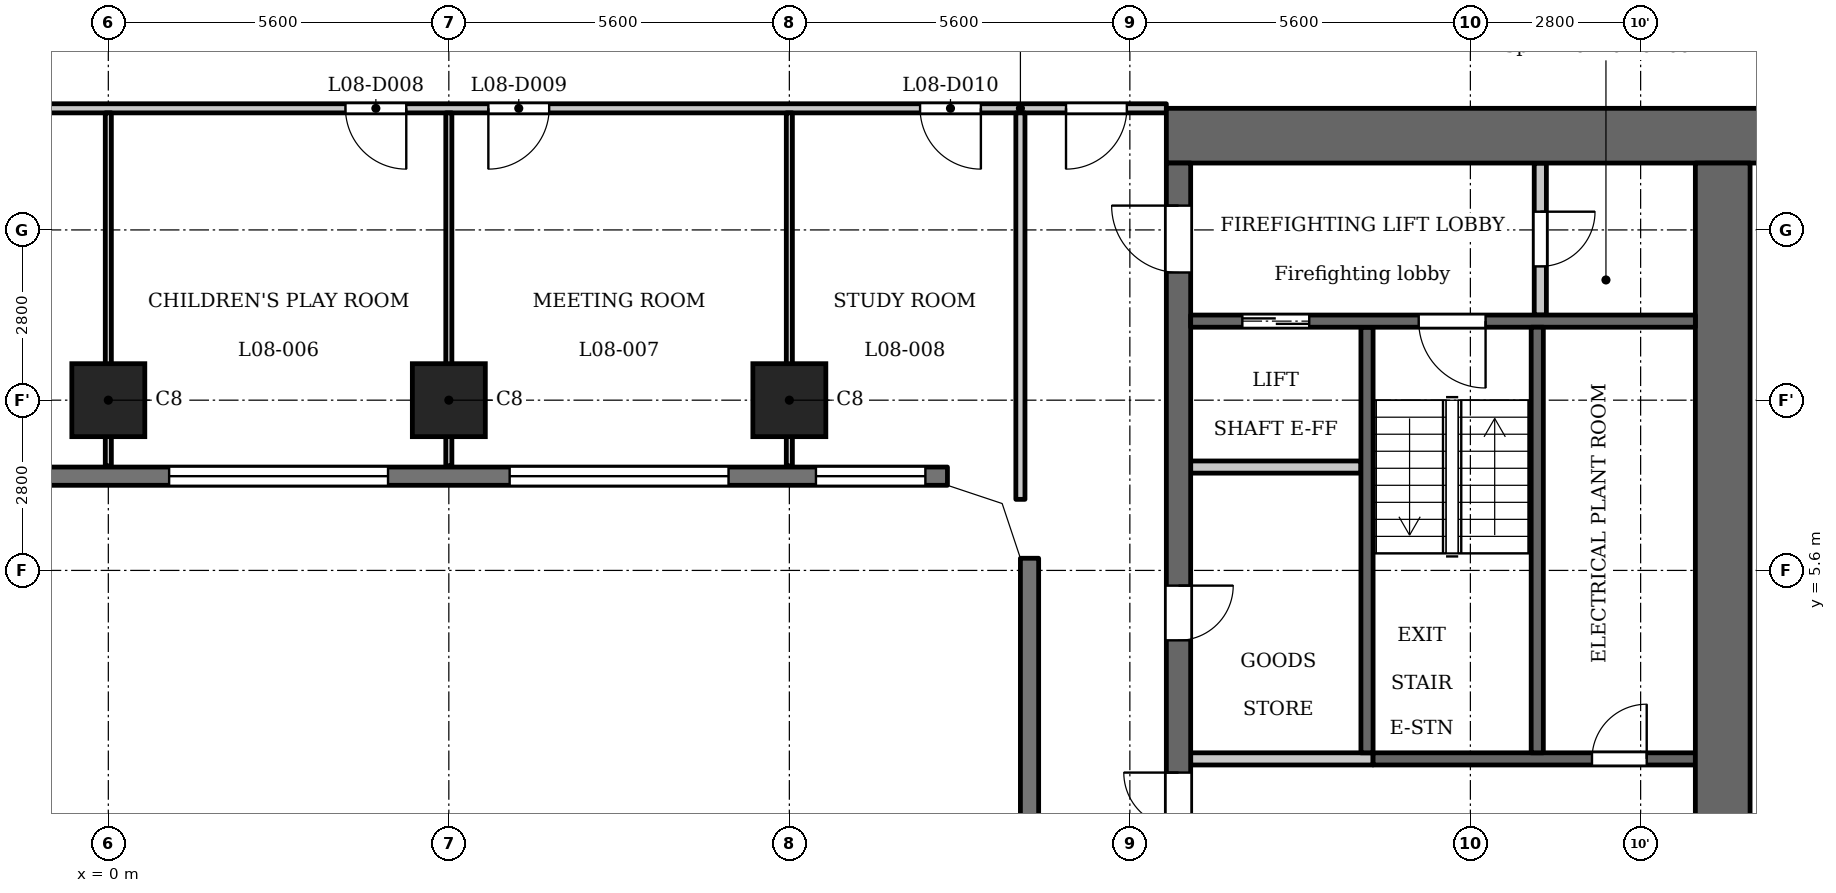
"""IFC4 building model, lengths in metres.
Left out: names, types, materials, properties, quantities, classifications, styles, units other than length and angle.
Written with IfcOpenShell. Run it as: python <this file> out.ifc"""

import sys

from ifc_helpers import new_model, si_unit, direction, frame, frame_2d, origin, origin_2d, place, context, subcontext, project, spatial, polyline, rectangle, outline, extrude, element, fill, save


model = new_model("IFC4")
c1 = context("Model", 3, precision=1e-05, world=origin(), true_north=direction((0.0, 1.0)))
c2 = subcontext(c1, "Body", "Model", "MODEL_VIEW")
j1 = project(units=[si_unit("LENGTHUNIT", "METRE"), si_unit("PLANEANGLEUNIT", "RADIAN")], contexts=[c1])
p1 = place(None, origin())
s1 = spatial("IfcSite", under=j1, at=p1, CompositionType="ELEMENT")
p2 = place(p1, origin())
s2 = spatial("IfcBuilding", under=s1, at=p2, CompositionType="ELEMENT")
p3 = place(p2, frame((0.0, 0.0, 37.5)))
s3 = spatial("IfcBuildingStorey", under=s2, at=p3, CompositionType="ELEMENT", Elevation=37.5)
for number, where, z_axis, x_axis in (
    (1, (0.0, 8.4, 0.0), (0.0, 0.0, 1.0), (1.0, 0.0, 0.0)),
    (2, (5.6, 8.4, 0.0), (0.0, 0.0, 1.0), (1.0, 0.0, 0.0)),
    (3, (11.2, 8.4, 0.0), (0.0, 0.0, 1.0), (1.0, 0.0, 0.0)),
):
    element("IfcColumn", number, at=place(p3, frame(where, z_axis=z_axis, x_axis=x_axis)), inside=s3, PredefinedType="COLUMN", context=c2, shape_type="SweptSolid", body=[
        extrude(rectangle(XDim=1.2, YDim=1.2, at=origin_2d()), origin(), (0.0, 0.0, 1.0), 3.5),
    ])
p4 = place(p3, frame((-13.8, 7.15, 0.0), z_axis=(0.0, 0.0, 1.0), x_axis=(1.0, 0.0, 0.0)))
e4 = element("IfcWall", 4, at=p4, inside=s3, PredefinedType="SOLIDWALL", context=c2, shape_type="SweptSolid", body=[
    extrude(rectangle(XDim=27.6, YDim=0.3, at=frame_2d((13.8, 0.0))), origin(), (0.0, 0.0, 1.0), 3.2),
])
p5 = place(p4, frame((0.363, 0.0, 0.9)))
e5 = element("IfcOpeningElement", 5, at=p5, cuts=e4, PredefinedType="OPENING", context=c2, shape_type="SweptSolid", body=[
    extrude(rectangle(XDim=1.8, YDim=1.25, at=frame_2d((0.9, 0.625))), frame((0.0, 0.16, 0.0), z_axis=(0.0, -1.0, 0.0), x_axis=(1.0, 0.0, 0.0)), (0.0, 0.0, 1.0), 0.32),
])
p6 = place(p4, frame((3.6, 0.0, 1.2)))
e6 = element("IfcOpeningElement", 6, at=p6, cuts=e4, PredefinedType="OPENING", context=c2, shape_type="SweptSolid", body=[
    extrude(rectangle(XDim=3.6, YDim=0.95, at=frame_2d((1.8, 0.475))), frame((0.0, 0.16, 0.0), z_axis=(0.0, -1.0, 0.0), x_axis=(1.0, 0.0, 0.0)), (0.0, 0.0, 1.0), 0.32),
])
p7 = place(p4, frame((9.2, 0.0, 1.2)))
e7 = element("IfcOpeningElement", 7, at=p7, cuts=e4, PredefinedType="OPENING", context=c2, shape_type="SweptSolid", body=[
    extrude(rectangle(XDim=3.6, YDim=0.95, at=frame_2d((1.8, 0.475))), frame((0.0, 0.16, 0.0), z_axis=(0.0, -1.0, 0.0), x_axis=(1.0, 0.0, 0.0)), (0.0, 0.0, 1.0), 0.32),
])
p8 = place(p4, frame((14.8, 0.0, 1.2)))
e8 = element("IfcOpeningElement", 8, at=p8, cuts=e4, PredefinedType="OPENING", context=c2, shape_type="SweptSolid", body=[
    extrude(rectangle(XDim=3.6, YDim=0.95, at=frame_2d((1.8, 0.475))), frame((0.0, 0.16, 0.0), z_axis=(0.0, -1.0, 0.0), x_axis=(1.0, 0.0, 0.0)), (0.0, 0.0, 1.0), 0.32),
])
p9 = place(p4, frame((20.4, 0.0, 1.2)))
e9 = element("IfcOpeningElement", 9, at=p9, cuts=e4, PredefinedType="OPENING", context=c2, shape_type="SweptSolid", body=[
    extrude(rectangle(XDim=3.6, YDim=0.95, at=frame_2d((1.8, 0.475))), frame((0.0, 0.16, 0.0), z_axis=(0.0, -1.0, 0.0), x_axis=(1.0, 0.0, 0.0)), (0.0, 0.0, 1.0), 0.32),
])
p10 = place(p4, frame((25.438, 0.0, 0.9)))
e10 = element("IfcOpeningElement", 10, at=p10, cuts=e4, PredefinedType="OPENING", context=c2, shape_type="SweptSolid", body=[
    extrude(rectangle(XDim=1.8, YDim=1.25, at=frame_2d((0.9, 0.625))), frame((0.0, 0.16, 0.0), z_axis=(0.0, -1.0, 0.0), x_axis=(1.0, 0.0, 0.0)), (0.0, 0.0, 1.0), 0.32),
])
p11 = place(p3, frame((15.15, 5.8, 0.0), z_axis=(0.0, 0.0, 1.0), x_axis=(0.0, -1.0, 0.0)))
e11 = element("IfcWall", 11, at=p11, inside=s3, PredefinedType="SOLIDWALL", context=c2, shape_type="SweptSolid", body=[
    extrude(rectangle(XDim=11.6, YDim=0.3, at=frame_2d((5.8, 0.0))), origin(), (0.0, 0.0, 1.0), 3.2),
])
p12 = place(p3, frame((20.7, 2.6, 0.0), z_axis=(0.0, 0.0, 1.0), x_axis=(0.0, 1.0, 0.0)))
e12 = element("IfcWall", 12, at=p12, inside=s3, PredefinedType="SHEAR", context=c2, shape_type="SweptSolid", body=[
    extrude(rectangle(XDim=7.0, YDim=0.2, at=frame_2d((3.5, 0.0))), origin(), (0.0, 0.0, 1.0), 3.2),
])
p13 = place(p3, frame((20.8, 2.5, 0.0), z_axis=(0.0, 0.0, 1.0), x_axis=(1.0, 0.0, 0.0)))
e13 = element("IfcWall", 13, at=p13, inside=s3, PredefinedType="SHEAR", context=c2, shape_type="SweptSolid", body=[
    extrude(rectangle(XDim=5.3, YDim=0.2, at=frame_2d((2.65, 0.0))), origin(), (0.0, 0.0, 1.0), 3.2),
])
p14 = place(p13, frame((3.6, 0.0, 0.0)))
e14 = element("IfcOpeningElement", 14, at=p14, cuts=e13, PredefinedType="OPENING", context=c2, shape_type="SweptSolid", body=[
    extrude(rectangle(XDim=0.9, YDim=2.1, at=frame_2d((0.45, 1.05))), frame((0.0, 0.11, 0.0), z_axis=(0.0, -1.0, 0.0), x_axis=(1.0, 0.0, 0.0)), (0.0, 0.0, 1.0), 0.22),
])
p15 = place(p3, frame((17.4, 12.75, 0.0), z_axis=(0.0, 0.0, 1.0), x_axis=(1.0, 0.0, 0.0)))
e15 = element("IfcWall", 15, at=p15, inside=s3, PredefinedType="SHEAR", context=c2, shape_type="SweptSolid", body=[
    extrude(rectangle(XDim=10.4, YDim=0.9, at=frame_2d((5.2, 0.0))), origin(), (0.0, 0.0, 1.0), 3.2),
])
p16 = place(p3, frame((17.6, -12.3, 0.0), z_axis=(0.0, 0.0, 1.0), x_axis=(0.0, 1.0, 0.0)))
e16 = element("IfcWall", 16, at=p16, inside=s3, PredefinedType="SHEAR", context=c2, shape_type="SweptSolid", body=[
    extrude(rectangle(XDim=24.6, YDim=0.4, at=frame_2d((12.3, 0.0))), origin(), (0.0, 0.0, 1.0), 3.2),
])
p17 = place(p16, frame((6.0, 0.0, 0.0)))
e17 = element("IfcOpeningElement", 17, at=p17, cuts=e16, PredefinedType="OPENING", context=c2, shape_type="SweptSolid", body=[
    extrude(rectangle(XDim=1.1, YDim=2.1, at=frame_2d((0.55, 1.05))), frame((0.0, 0.21, 0.0), z_axis=(0.0, -1.0, 0.0), x_axis=(1.0, 0.0, 0.0)), (0.0, 0.0, 1.0), 0.42),
])
p18 = place(p16, frame((8.4, 0.0, 0.0)))
e18 = element("IfcOpeningElement", 18, at=p18, cuts=e16, PredefinedType="OPENING", context=c2, shape_type="SweptSolid", body=[
    extrude(rectangle(XDim=1.1, YDim=2.1, at=frame_2d((0.55, 1.05))), frame((0.0, 0.21, 0.0), z_axis=(0.0, -1.0, 0.0), x_axis=(1.0, 0.0, 0.0)), (0.0, 0.0, 1.0), 0.42),
])
p19 = place(p16, frame((10.8, 0.0, 0.0)))
e19 = element("IfcOpeningElement", 19, at=p19, cuts=e16, PredefinedType="OPENING", context=c2, shape_type="SweptSolid", body=[
    extrude(rectangle(XDim=1.1, YDim=2.1, at=frame_2d((0.55, 1.05))), frame((0.0, 0.21, 0.0), z_axis=(0.0, -1.0, 0.0), x_axis=(1.0, 0.0, 0.0)), (0.0, 0.0, 1.0), 0.42),
])
p20 = place(p16, frame((16.75, 0.0, 0.0)))
e20 = element("IfcOpeningElement", 20, at=p20, cuts=e16, PredefinedType="OPENING", context=c2, shape_type="SweptSolid", body=[
    extrude(rectangle(XDim=0.9, YDim=2.1, at=frame_2d((0.45, 1.05))), frame((0.0, 0.21, 0.0), z_axis=(0.0, -1.0, 0.0), x_axis=(1.0, 0.0, 0.0)), (0.0, 0.0, 1.0), 0.42),
])
p21 = place(p16, frame((22.8, 0.0, 0.0)))
e21 = element("IfcOpeningElement", 21, at=p21, cuts=e16, PredefinedType="OPENING", context=c2, shape_type="SweptSolid", body=[
    extrude(rectangle(XDim=1.1, YDim=2.1, at=frame_2d((0.55, 1.05))), frame((0.0, 0.21, 0.0), z_axis=(0.0, -1.0, 0.0), x_axis=(1.0, 0.0, 0.0)), (0.0, 0.0, 1.0), 0.42),
])
p22 = place(p16, frame((0.7, 0.0, 0.0)))
e22 = element("IfcOpeningElement", 22, at=p22, cuts=e16, PredefinedType="OPENING", context=c2, shape_type="SweptSolid", body=[
    extrude(rectangle(XDim=1.1, YDim=2.1, at=frame_2d((0.55, 1.05))), frame((0.0, 0.21, 0.0), z_axis=(0.0, -1.0, 0.0), x_axis=(1.0, 0.0, 0.0)), (0.0, 0.0, 1.0), 0.42),
])
p23 = place(p16, frame((12.775, 0.0, 0.0)))
e23 = element("IfcOpeningElement", 23, at=p23, cuts=e16, PredefinedType="OPENING", context=c2, shape_type="SweptSolid", body=[
    extrude(rectangle(XDim=1.8, YDim=2.1, at=frame_2d((0.9, 1.05))), frame((0.0, 0.21, 0.0), z_axis=(0.0, -1.0, 0.0), x_axis=(1.0, 0.0, 0.0)), (0.0, 0.0, 1.0), 0.42),
])
p24 = place(p3, frame((26.55, -12.3, 0.0), z_axis=(0.0, 0.0, 1.0), x_axis=(0.0, 1.0, 0.0)))
e24 = element("IfcWall", 24, at=p24, inside=s3, PredefinedType="SHEAR", context=c2, shape_type="SweptSolid", body=[
    extrude(rectangle(XDim=24.6, YDim=0.9, at=frame_2d((12.3, 0.0))), origin(), (0.0, 0.0, 1.0), 3.2),
])
p25 = place(p3, frame((23.55, 9.8, 0.0), z_axis=(0.0, 0.0, 1.0), x_axis=(0.0, 1.0, 0.0)))
e25 = element("IfcWall", 25, at=p25, inside=s3, PredefinedType="PARTITIONING", context=c2, shape_type="SweptSolid", body=[
    extrude(rectangle(XDim=2.5, YDim=0.2, at=frame_2d((1.25, 0.0))), origin(), (0.0, 0.0, 1.0), 3.2),
])
p26 = place(p25, frame((0.8, 0.0, 0.0)))
e26 = element("IfcOpeningElement", 26, at=p26, cuts=e25, PredefinedType="OPENING", context=c2, shape_type="SweptSolid", body=[
    extrude(rectangle(XDim=0.9, YDim=2.1, at=frame_2d((0.45, 1.05))), frame((0.0, 0.11, 0.0), z_axis=(0.0, -1.0, 0.0), x_axis=(1.0, 0.0, 0.0)), (0.0, 0.0, 1.0), 0.22),
])
p27 = place(p3, frame((17.8, 2.5, 0.0), z_axis=(0.0, 0.0, 1.0), x_axis=(1.0, 0.0, 0.0)))
e27 = element("IfcWall", 27, at=p27, inside=s3, PredefinedType="PARTITIONING", context=c2, shape_type="SweptSolid", body=[
    extrude(rectangle(XDim=3.0, YDim=0.2, at=frame_2d((1.5, 0.0))), origin(), (0.0, 0.0, 1.0), 3.2),
])
p28 = place(p3, frame((17.8, 7.3, 0.0), z_axis=(0.0, 0.0, 1.0), x_axis=(1.0, 0.0, 0.0)))
e28 = element("IfcWall", 28, at=p28, inside=s3, PredefinedType="PARTITIONING", context=c2, shape_type="SweptSolid", body=[
    extrude(rectangle(XDim=2.8, YDim=0.2, at=frame_2d((1.4, 0.0))), origin(), (0.0, 0.0, 1.0), 3.2),
])
p29 = place(p3, frame((17.8, 9.7, 0.0), z_axis=(0.0, 0.0, 1.0), x_axis=(1.0, 0.0, 0.0)))
e29 = element("IfcWall", 29, at=p29, inside=s3, PredefinedType="SHEAR", context=c2, shape_type="SweptSolid", body=[
    extrude(rectangle(XDim=8.3, YDim=0.2, at=frame_2d((4.15, 0.0))), origin(), (0.0, 0.0, 1.0), 3.2),
])
p30 = place(p29, frame((0.85, 0.0, 0.0)))
e30 = element("IfcOpeningElement", 30, at=p30, cuts=e29, PredefinedType="OPENING", context=c2, shape_type="SweptSolid", body=[
    extrude(rectangle(XDim=1.1, YDim=2.1, at=frame_2d((0.55, 1.05))), frame((0.0, 0.11, 0.0), z_axis=(0.0, -1.0, 0.0), x_axis=(1.0, 0.0, 0.0)), (0.0, 0.0, 1.0), 0.22),
])
p31 = place(p29, frame((3.75, 0.0, 0.0)))
e31 = element("IfcOpeningElement", 31, at=p31, cuts=e29, PredefinedType="OPENING", context=c2, shape_type="SweptSolid", body=[
    extrude(rectangle(XDim=1.1, YDim=2.1, at=frame_2d((0.55, 1.05))), frame((0.0, 0.11, 0.0), z_axis=(0.0, -1.0, 0.0), x_axis=(1.0, 0.0, 0.0)), (0.0, 0.0, 1.0), 0.22),
])
p32 = place(p3, frame((23.5, 2.6, 0.0), z_axis=(0.0, 0.0, 1.0), x_axis=(0.0, 1.0, 0.0)))
e32 = element("IfcWall", 32, at=p32, inside=s3, PredefinedType="SHEAR", context=c2, shape_type="SweptSolid", body=[
    extrude(rectangle(XDim=7.0, YDim=0.2, at=frame_2d((3.5, 0.0))), origin(), (0.0, 0.0, 1.0), 3.2),
])
p33 = place(p3, frame((-17.4, 13.2, 0.0), z_axis=(0.0, 0.0, 1.0), x_axis=(1.0, 0.0, 0.0)))
e33 = element("IfcWall", 33, at=p33, inside=s3, PredefinedType="PARTITIONING", context=c2, shape_type="SweptSolid", body=[
    extrude(rectangle(XDim=34.8, YDim=0.15, at=frame_2d((17.4, 0.0))), origin(), (0.0, 0.0, 1.0), 3.2),
])
p34 = place(p33, frame((0.75, 0.0, 0.0)))
e34 = element("IfcOpeningElement", 34, at=p34, cuts=e33, PredefinedType="OPENING", context=c2, shape_type="SweptSolid", body=[
    extrude(rectangle(XDim=1.0, YDim=2.1, at=frame_2d((0.5, 1.05))), frame((0.0, 0.085, 0.0), z_axis=(0.0, -1.0, 0.0), x_axis=(1.0, 0.0, 0.0)), (0.0, 0.0, 1.0), 0.17),
])
p35 = place(p33, frame((33.15, 0.0, 0.0)))
e35 = element("IfcOpeningElement", 35, at=p35, cuts=e33, PredefinedType="OPENING", context=c2, shape_type="SweptSolid", body=[
    extrude(rectangle(XDim=1.0, YDim=2.1, at=frame_2d((0.5, 1.05))), frame((0.0, 0.085, 0.0), z_axis=(0.0, -1.0, 0.0), x_axis=(1.0, 0.0, 0.0)), (0.0, 0.0, 1.0), 0.17),
])
p36 = place(p33, frame((3.05, 0.0, 0.0)))
e36 = element("IfcOpeningElement", 36, at=p36, cuts=e33, PredefinedType="OPENING", context=c2, shape_type="SweptSolid", body=[
    extrude(rectangle(XDim=1.0, YDim=2.1, at=frame_2d((0.5, 1.05))), frame((0.0, 0.085, 0.0), z_axis=(0.0, -1.0, 0.0), x_axis=(1.0, 0.0, 0.0)), (0.0, 0.0, 1.0), 0.17),
])
p37 = place(p33, frame((10.1, 0.0, 0.0)))
e37 = element("IfcOpeningElement", 37, at=p37, cuts=e33, PredefinedType="OPENING", context=c2, shape_type="SweptSolid", body=[
    extrude(rectangle(XDim=1.0, YDim=2.1, at=frame_2d((0.5, 1.05))), frame((0.0, 0.085, 0.0), z_axis=(0.0, -1.0, 0.0), x_axis=(1.0, 0.0, 0.0)), (0.0, 0.0, 1.0), 0.17),
])
p38 = place(p33, frame((12.45, 0.0, 0.0)))
e38 = element("IfcOpeningElement", 38, at=p38, cuts=e33, PredefinedType="OPENING", context=c2, shape_type="SweptSolid", body=[
    extrude(rectangle(XDim=1.0, YDim=2.1, at=frame_2d((0.5, 1.05))), frame((0.0, 0.085, 0.0), z_axis=(0.0, -1.0, 0.0), x_axis=(1.0, 0.0, 0.0)), (0.0, 0.0, 1.0), 0.17),
])
p39 = place(p33, frame((21.3, 0.0, 0.0)))
e39 = element("IfcOpeningElement", 39, at=p39, cuts=e33, PredefinedType="OPENING", context=c2, shape_type="SweptSolid", body=[
    extrude(rectangle(XDim=1.0, YDim=2.1, at=frame_2d((0.5, 1.05))), frame((0.0, 0.085, 0.0), z_axis=(0.0, -1.0, 0.0), x_axis=(1.0, 0.0, 0.0)), (0.0, 0.0, 1.0), 0.17),
])
p40 = place(p33, frame((23.65, 0.0, 0.0)))
e40 = element("IfcOpeningElement", 40, at=p40, cuts=e33, PredefinedType="OPENING", context=c2, shape_type="SweptSolid", body=[
    extrude(rectangle(XDim=1.0, YDim=2.1, at=frame_2d((0.5, 1.05))), frame((0.0, 0.085, 0.0), z_axis=(0.0, -1.0, 0.0), x_axis=(1.0, 0.0, 0.0)), (0.0, 0.0, 1.0), 0.17),
])
p41 = place(p33, frame((30.75, 0.0, 0.0)))
e41 = element("IfcOpeningElement", 41, at=p41, cuts=e33, PredefinedType="OPENING", context=c2, shape_type="SweptSolid", body=[
    extrude(rectangle(XDim=1.0, YDim=2.1, at=frame_2d((0.5, 1.05))), frame((0.0, 0.085, 0.0), z_axis=(0.0, -1.0, 0.0), x_axis=(1.0, 0.0, 0.0)), (0.0, 0.0, 1.0), 0.17),
])
for number, where, z_axis, x_axis in (
    (42, (0.0, 7.32, 0.0), (0.0, 0.0, 1.0), (0.0, 1.0, 0.0)),
    (43, (5.6, 7.32, 0.0), (0.0, 0.0, 1.0), (0.0, 1.0, 0.0)),
    (44, (11.2, 7.32, 0.0), (0.0, 0.0, 1.0), (0.0, 1.0, 0.0)),
):
    element("IfcWall", number, at=place(p3, frame(where, z_axis=z_axis, x_axis=x_axis)), inside=s3, PredefinedType="PARTITIONING", context=c2, shape_type="SweptSolid", body=[
        extrude(rectangle(XDim=5.805, YDim=0.1, at=frame_2d((2.902, 0.0))), origin(), (0.0, 0.0, 1.0), 3.2),
    ])
p42 = place(p3, frame((15.0, 6.769, 0.0), z_axis=(0.0, 0.0, 1.0), x_axis=(0.0, 1.0, 0.0)))
e45 = element("IfcWall", 45, at=p42, inside=s3, PredefinedType="PARTITIONING", context=c2, shape_type="SweptSolid", body=[
    extrude(rectangle(XDim=6.356, YDim=0.15, at=frame_2d((3.178, 0.0))), origin(), (0.0, 0.0, 1.0), 3.2),
])
p43 = place(p3, origin())
e46 = element("IfcWall", 46, at=p43, inside=s3, PredefinedType="SOLIDWALL", context=c2, shape_type="SweptSolid", body=[
    extrude(outline(polyline([(14.937, 6.937), (13.849, 7.3), (13.8, 7.3), (13.8, 7.0), (14.7, 6.7), (15.0, 5.8), (15.3, 5.8), (15.3, 5.849), (14.937, 6.937)])), origin(), (0.0, 0.0, 1.0), 3.2),
])
p44 = place(p20, origin())
e47 = element("IfcDoor", 47, at=p44, inside=s3, OperationType="SINGLE_SWING_RIGHT", PredefinedType="DOOR", context=c2, shape_type="SweptSolid", body=[
    extrude(rectangle(XDim=0.9, YDim=2.1, at=frame_2d((0.45, 1.05))), frame((0.0, 0.025, 0.0), z_axis=(0.0, -1.0, 0.0), x_axis=(1.0, 0.0, 0.0)), (0.0, 0.0, 1.0), 0.05),
])
fill(e20, e47)
p45 = place(p30, origin())
e48 = element("IfcDoor", 48, at=p45, inside=s3, OperationType="DOUBLE_DOOR_SLIDING", PredefinedType="DOOR", context=c2, shape_type="SweptSolid", body=[
    extrude(rectangle(XDim=1.1, YDim=2.1, at=frame_2d((0.55, 1.05))), frame((0.0, 0.025, 0.0), z_axis=(0.0, -1.0, 0.0), x_axis=(1.0, 0.0, 0.0)), (0.0, 0.0, 1.0), 0.05),
])
fill(e30, e48)
p46 = place(p21, origin())
e49 = element("IfcDoor", 49, at=p46, inside=s3, OperationType="SINGLE_SWING_LEFT", PredefinedType="DOOR", context=c2, shape_type="SweptSolid", body=[
    extrude(rectangle(XDim=1.1, YDim=2.1, at=frame_2d((0.55, 1.05))), frame((0.0, 0.025, 0.0), z_axis=(0.0, -1.0, 0.0), x_axis=(1.0, 0.0, 0.0)), (0.0, 0.0, 1.0), 0.05),
])
fill(e21, e49)
p47 = place(p26, origin())
e50 = element("IfcDoor", 50, at=p47, inside=s3, OperationType="SINGLE_SWING_RIGHT", PredefinedType="DOOR", context=c2, shape_type="SweptSolid", body=[
    extrude(rectangle(XDim=0.9, YDim=2.1, at=frame_2d((0.45, 1.05))), frame((0.0, 0.025, 0.0), z_axis=(0.0, -1.0, 0.0), x_axis=(1.0, 0.0, 0.0)), (0.0, 0.0, 1.0), 0.05),
])
fill(e26, e50)
p48 = place(p31, origin())
e51 = element("IfcDoor", 51, at=p48, inside=s3, OperationType="SINGLE_SWING_RIGHT", PredefinedType="DOOR", context=c2, shape_type="SweptSolid", body=[
    extrude(rectangle(XDim=1.1, YDim=2.1, at=frame_2d((0.55, 1.05))), frame((0.0, 0.025, 0.0), z_axis=(0.0, -1.0, 0.0), x_axis=(1.0, 0.0, 0.0)), (0.0, 0.0, 1.0), 0.05),
])
fill(e31, e51)
p49 = place(p23, origin())
e52 = element("IfcDoor", 52, at=p49, inside=s3, OperationType="DOUBLE_DOOR_SINGLE_SWING", PredefinedType="DOOR", context=c2, shape_type="SweptSolid", body=[
    extrude(rectangle(XDim=1.8, YDim=2.1, at=frame_2d((0.9, 1.05))), frame((0.0, 0.025, 0.0), z_axis=(0.0, -1.0, 0.0), x_axis=(1.0, 0.0, 0.0)), (0.0, 0.0, 1.0), 0.05),
])
fill(e23, e52)
p50 = place(p14, origin())
e53 = element("IfcDoor", 53, at=p50, inside=s3, OperationType="SINGLE_SWING_LEFT", PredefinedType="DOOR", context=c2, shape_type="SweptSolid", body=[
    extrude(rectangle(XDim=0.9, YDim=2.1, at=frame_2d((0.45, 1.05))), frame((0.0, 0.025, 0.0), z_axis=(0.0, -1.0, 0.0), x_axis=(1.0, 0.0, 0.0)), (0.0, 0.0, 1.0), 0.05),
])
fill(e14, e53)
p51 = place(p35, origin())
e54 = element("IfcDoor", 54, at=p51, inside=s3, OperationType="SINGLE_SWING_LEFT", PredefinedType="DOOR", context=c2, shape_type="SweptSolid", body=[
    extrude(rectangle(XDim=1.0, YDim=2.1, at=frame_2d((0.5, 1.05))), frame((0.0, 0.025, 0.0), z_axis=(0.0, -1.0, 0.0), x_axis=(1.0, 0.0, 0.0)), (0.0, 0.0, 1.0), 0.05),
])
fill(e35, e54)
p52 = place(p39, origin())
e55 = element("IfcDoor", 55, at=p52, inside=s3, OperationType="SINGLE_SWING_RIGHT", PredefinedType="DOOR", context=c2, shape_type="SweptSolid", body=[
    extrude(rectangle(XDim=1.0, YDim=2.1, at=frame_2d((0.5, 1.05))), frame((0.0, 0.025, 0.0), z_axis=(0.0, -1.0, 0.0), x_axis=(1.0, 0.0, 0.0)), (0.0, 0.0, 1.0), 0.05),
])
fill(e39, e55)
p53 = place(p40, origin())
e56 = element("IfcDoor", 56, at=p53, inside=s3, OperationType="SINGLE_SWING_LEFT", PredefinedType="DOOR", context=c2, shape_type="SweptSolid", body=[
    extrude(rectangle(XDim=1.0, YDim=2.1, at=frame_2d((0.5, 1.05))), frame((0.0, 0.025, 0.0), z_axis=(0.0, -1.0, 0.0), x_axis=(1.0, 0.0, 0.0)), (0.0, 0.0, 1.0), 0.05),
])
fill(e40, e56)
p54 = place(p41, origin())
e57 = element("IfcDoor", 57, at=p54, inside=s3, OperationType="SINGLE_SWING_RIGHT", PredefinedType="DOOR", context=c2, shape_type="SweptSolid", body=[
    extrude(rectangle(XDim=1.0, YDim=2.1, at=frame_2d((0.5, 1.05))), frame((0.0, 0.025, 0.0), z_axis=(0.0, -1.0, 0.0), x_axis=(1.0, 0.0, 0.0)), (0.0, 0.0, 1.0), 0.05),
])
fill(e41, e57)
p55 = place(p8, origin())
e58 = element("IfcWindow", 58, at=p55, inside=s3, PartitioningType="SINGLE_PANEL", PredefinedType="WINDOW", context=c2, shape_type="SweptSolid", body=[
    extrude(rectangle(XDim=3.6, YDim=0.95, at=frame_2d((1.8, 0.475))), frame((0.0, 0.03, 0.0), z_axis=(0.0, -1.0, 0.0), x_axis=(1.0, 0.0, 0.0)), (0.0, 0.0, 1.0), 0.06),
])
fill(e8, e58)
p56 = place(p9, origin())
e59 = element("IfcWindow", 59, at=p56, inside=s3, PartitioningType="SINGLE_PANEL", PredefinedType="WINDOW", context=c2, shape_type="SweptSolid", body=[
    extrude(rectangle(XDim=3.6, YDim=0.95, at=frame_2d((1.8, 0.475))), frame((0.0, 0.03, 0.0), z_axis=(0.0, -1.0, 0.0), x_axis=(1.0, 0.0, 0.0)), (0.0, 0.0, 1.0), 0.06),
])
fill(e9, e59)
p57 = place(p10, origin())
e60 = element("IfcWindow", 60, at=p57, inside=s3, PartitioningType="SINGLE_PANEL", PredefinedType="WINDOW", context=c2, shape_type="SweptSolid", body=[
    extrude(rectangle(XDim=1.8, YDim=1.25, at=frame_2d((0.9, 0.625))), frame((0.0, 0.03, 0.0), z_axis=(0.0, -1.0, 0.0), x_axis=(1.0, 0.0, 0.0)), (0.0, 0.0, 1.0), 0.06),
])
fill(e10, e60)
save(model, sys.argv[1])
